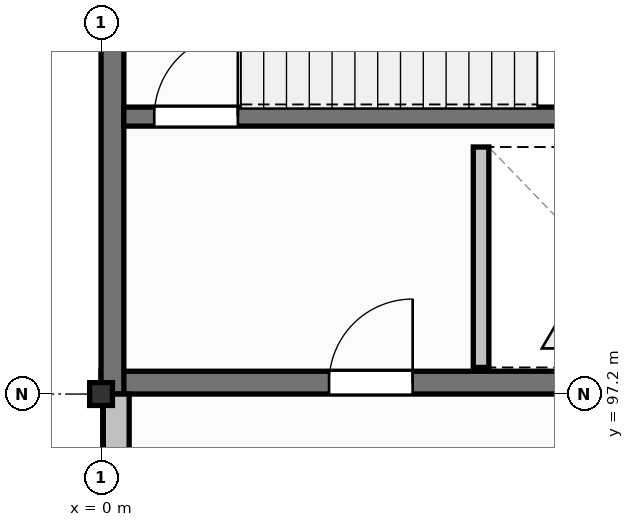
"""IFC4 building model, lengths in metres.
Left out: names, types, materials, properties, quantities, classifications, styles, units other than length and angle.
Written with IfcOpenShell. Run it as: python <this file> out.ifc"""

import sys

from ifc_helpers import new_model, si_unit, direction, frame, frame_2d, origin, origin_2d, place, context, subcontext, project, spatial, rectangle, i_section, extrude, element, fill, save


model = new_model("IFC4")
c1 = context("Model", 3, precision=1e-05, world=origin(), true_north=direction((0.0, 1.0)))
c2 = subcontext(c1, "Body", "Model", "MODEL_VIEW")
j1 = project(units=[si_unit("LENGTHUNIT", "METRE"), si_unit("PLANEANGLEUNIT", "RADIAN")], contexts=[c1])
p1 = place(None, origin())
s1 = spatial("IfcSite", under=j1, at=p1, CompositionType="ELEMENT")
p2 = place(p1, origin())
s2 = spatial("IfcBuilding", under=s1, at=p2, CompositionType="ELEMENT")
p3 = place(p2, frame((0.0, 0.0, 9.0)))
s3 = spatial("IfcBuildingStorey", under=s2, at=p3, CompositionType="ELEMENT", Elevation=9.0)
p4 = place(p3, frame((0.0, 97.35, 0.0), z_axis=(0.0, 0.0, 1.0), x_axis=(1.0, 0.0, 0.0)))
e1 = element("IfcWall", 1, at=p4, inside=s3, PredefinedType="SHEAR", context=c2, shape_type="SweptSolid", body=[
    extrude(rectangle(XDim=8.4, YDim=0.3, at=frame_2d((4.2, 0.0))), origin(), (0.0, 0.0, 1.0), 4.2),
])
p5 = place(p4, frame((3.0, 0.0, 0.0)))
e2 = element("IfcOpeningElement", 2, at=p5, cuts=e1, PredefinedType="OPENING", context=c2, shape_type="SweptSolid", body=[
    extrude(rectangle(XDim=1.1, YDim=2.15, at=frame_2d((0.55, 1.075))), frame((0.0, 0.16, 0.0), z_axis=(0.0, -1.0, 0.0), x_axis=(1.0, 0.0, 0.0)), (0.0, 0.0, 1.0), 0.32),
])
p6 = place(p3, frame((0.15, 97.2, 0.0), z_axis=(0.0, 0.0, 1.0), x_axis=(0.0, 1.0, 0.0)))
e3 = element("IfcWall", 3, at=p6, inside=s3, PredefinedType="SHEAR", context=c2, shape_type="SweptSolid", body=[
    extrude(rectangle(XDim=7.2, YDim=0.3, at=frame_2d((3.6, 0.0))), origin(), (0.0, 0.0, 1.0), 4.2),
])
p7 = place(p3, frame((0.3, 100.85, 0.0), z_axis=(0.0, 0.0, 1.0), x_axis=(1.0, 0.0, 0.0)))
e4 = element("IfcWall", 4, at=p7, inside=s3, PredefinedType="SHEAR", context=c2, shape_type="SweptSolid", body=[
    extrude(rectangle(XDim=7.8, YDim=0.25, at=frame_2d((3.9, 0.0))), origin(), (0.0, 0.0, 1.0), 4.2),
])
p8 = place(p7, frame((0.4, 0.0, 0.0)))
e5 = element("IfcOpeningElement", 5, at=p8, cuts=e4, PredefinedType="OPENING", context=c2, shape_type="SweptSolid", body=[
    extrude(rectangle(XDim=1.1, YDim=2.15, at=frame_2d((0.55, 1.075))), frame((0.0, 0.135, 0.0), z_axis=(0.0, -1.0, 0.0), x_axis=(1.0, 0.0, 0.0)), (0.0, 0.0, 1.0), 0.27),
])
p9 = place(p3, frame((0.0, 97.2, 0.0), z_axis=(0.0, 0.0, 1.0), x_axis=(1.0, 0.0, 0.0)))
e6 = element("IfcColumn", 6, at=p9, inside=s3, PredefinedType="COLUMN", context=c2, shape_type="SweptSolid", body=[
    extrude(i_section(OverallWidth=0.3, OverallDepth=0.3, WebThickness=0.011, FlangeThickness=0.019, FilletRadius=0.027, at=origin_2d()), origin(), (0.0, 0.0, 1.0), 4.2),
])
p10 = place(p3, frame((0.2, 90.0, 0.0), z_axis=(0.0, 0.0, 1.0), x_axis=(0.0, 1.0, 0.0)))
e7 = element("IfcWall", 7, at=p10, inside=s3, PredefinedType="SOLIDWALL", context=c2, shape_type="SweptSolid", body=[
    extrude(rectangle(XDim=7.2, YDim=0.34, at=frame_2d((3.6, 0.0))), origin(), (0.0, 0.0, 1.0), 3.528),
])
p11 = place(p10, frame((1.2, 0.0, 0.85)))
e8 = element("IfcOpeningElement", 8, at=p11, cuts=e7, PredefinedType="OPENING", context=c2, shape_type="SweptSolid", body=[
    extrude(rectangle(XDim=2.4, YDim=2.05, at=frame_2d((1.2, 1.025))), frame((0.0, 0.18, 0.0), z_axis=(0.0, -1.0, 0.0), x_axis=(1.0, 0.0, 0.0)), (0.0, 0.0, 1.0), 0.36),
])
p12 = place(p10, frame((4.175, 0.0, 0.85)))
e9 = element("IfcOpeningElement", 9, at=p12, cuts=e7, PredefinedType="OPENING", context=c2, shape_type="SweptSolid", body=[
    extrude(rectangle(XDim=1.25, YDim=1.5, at=frame_2d((0.625, 0.75))), frame((0.0, 0.18, 0.0), z_axis=(0.0, -1.0, 0.0), x_axis=(1.0, 0.0, 0.0)), (0.0, 0.0, 1.0), 0.36),
])
p13 = place(p3, frame((5.0, 97.55, 0.0), z_axis=(0.0, 0.0, 1.0), x_axis=(0.0, 1.0, 0.0)))
e10 = element("IfcWall", 10, at=p13, inside=s3, PredefinedType="PARTITIONING", context=c2, shape_type="SweptSolid", body=[
    extrude(rectangle(XDim=2.9, YDim=0.205, at=frame_2d((1.45, 0.0))), origin(), (0.0, 0.0, 1.0), 3.93),
])
p14 = place(p8, origin())
e11 = element("IfcDoor", 11, at=p14, inside=s3, OperationType="SINGLE_SWING_RIGHT", PredefinedType="DOOR", context=c2, shape_type="SweptSolid", body=[
    extrude(rectangle(XDim=1.1, YDim=2.15, at=frame_2d((0.55, 1.075))), frame((0.0, 0.025, 0.0), z_axis=(0.0, -1.0, 0.0), x_axis=(1.0, 0.0, 0.0)), (0.0, 0.0, 1.0), 0.05),
])
fill(e5, e11)
p15 = place(p5, origin())
e12 = element("IfcDoor", 12, at=p15, inside=s3, OperationType="SINGLE_SWING_RIGHT", PredefinedType="DOOR", context=c2, shape_type="SweptSolid", body=[
    extrude(rectangle(XDim=1.1, YDim=2.15, at=frame_2d((0.55, 1.075))), frame((0.0, 0.025, 0.0), z_axis=(0.0, -1.0, 0.0), x_axis=(1.0, 0.0, 0.0)), (0.0, 0.0, 1.0), 0.05),
])
fill(e2, e12)
save(model, sys.argv[1])
